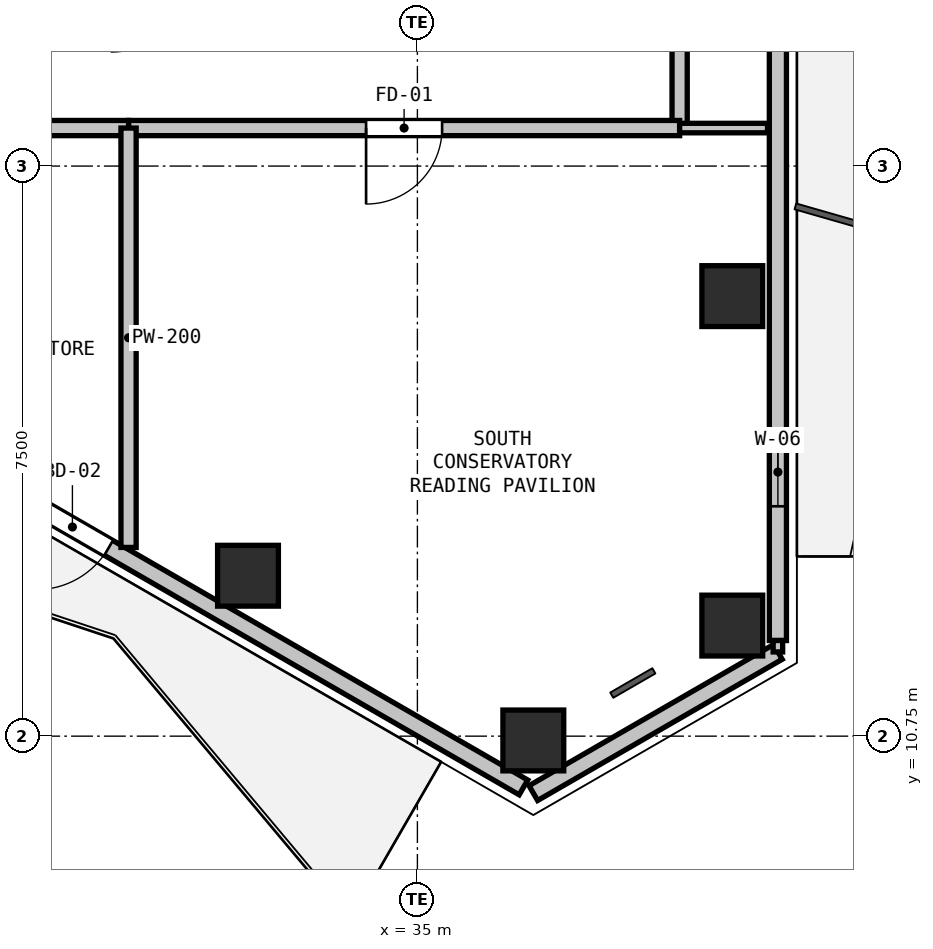
"""IFC4 building model, lengths in metres.
Left out: names, types, materials, properties, quantities, classifications, styles, units other than length and angle.
Written with IfcOpenShell. Run it as: python <this file> out.ifc"""

import sys

from ifc_helpers import new_model, si_unit, direction, frame, frame_2d, origin, origin_2d, place, context, subcontext, project, spatial, rectangle, hollow_rectangle, extrude, element, fill, save


model = new_model("IFC4")
c1 = context("Model", 3, precision=1e-05, world=origin(), true_north=direction((0.0, 1.0)))
c2 = subcontext(c1, "Body", "Model", "MODEL_VIEW")
j1 = project(units=[si_unit("LENGTHUNIT", "METRE"), si_unit("PLANEANGLEUNIT", "RADIAN")], contexts=[c1])
p1 = place(None, origin())
s1 = spatial("IfcSite", under=j1, at=p1, CompositionType="ELEMENT")
p2 = place(p1, origin())
s2 = spatial("IfcBuilding", under=s1, at=p2, CompositionType="ELEMENT")
p3 = place(p2, frame((0.0, 0.0, 249.6)))
s3 = spatial("IfcBuildingStorey", under=s2, at=p3, CompositionType="ELEMENT", Elevation=249.6)
for number, where, z_axis, x_axis in (
    (1, (39.143, 16.539, 0.0), (0.0, 0.0, 1.0), (1.0, 0.0, 0.0)),
    (2, (39.143, 12.205, 0.0), (0.0, 0.0, 1.0), (1.0, 0.0, 0.0)),
    (3, (36.525, 10.693, 0.0), (0.0, 0.0, 1.0), (1.0, 0.0, 0.0)),
    (4, (32.771, 12.861, 0.0), (0.0, 0.0, 1.0), (1.0, 0.0, 0.0)),
):
    element("IfcColumn", number, at=place(p3, frame(where, z_axis=z_axis, x_axis=x_axis)), inside=s3, PredefinedType="COLUMN", context=c2, shape_type="SweptSolid", body=[
        extrude(hollow_rectangle(XDim=0.8, YDim=0.8, WallThickness=0.025, at=origin_2d()), origin(), (0.0, 0.0, 1.0), 4.5),
    ])
p4 = place(p3, frame((39.743, 11.858, 0.0), z_axis=(0.0, 0.0, 1.0), x_axis=(-0.866038962515, -0.499976514854, 0.0)))
e5 = element("IfcWall", 5, at=p4, inside=s3, PredefinedType="SOLIDWALL", context=c2, shape_type="SweptSolid", body=[
    extrude(rectangle(XDim=3.716, YDim=0.225, at=frame_2d((1.858, 0.0))), origin(), (0.0, 0.0, 1.0), 3.84),
])
p5 = place(p3, frame((39.743, 20.936, 0.0), z_axis=(0.0, 0.0, 1.0), x_axis=(0.0, -1.0, 0.0)))
e6 = element("IfcWall", 6, at=p5, inside=s3, PredefinedType="SOLIDWALL", context=c2, shape_type="SweptSolid", body=[
    extrude(rectangle(XDim=8.928, YDim=0.225, at=frame_2d((4.464, 0.0))), origin(), (0.0, 0.0, 1.0), 3.84),
])
p6 = place(p5, frame((6.262, 0.0, 0.9)))
e7 = element("IfcOpeningElement", 7, at=p6, cuts=e6, PredefinedType="OPENING", context=c2, shape_type="SweptSolid", body=[
    extrude(rectangle(XDim=0.9, YDim=1.4, at=frame_2d((0.45, 0.7))), frame((0.0, 0.123, 0.0), z_axis=(0.0, -1.0, 0.0), x_axis=(1.0, 0.0, 0.0)), (0.0, 0.0, 1.0), 0.245),
])
p7 = place(p3, frame((36.395, 10.076, 0.0), z_axis=(0.0, 0.0, 1.0), x_axis=(-0.866026655105, 0.499997832642, 0.0)))
e8 = element("IfcWall", 8, at=p7, inside=s3, PredefinedType="SOLIDWALL", context=c2, shape_type="SweptSolid", body=[
    extrude(rectangle(XDim=8.928, YDim=0.225, at=frame_2d((4.464, 0.0))), origin(), (0.0, 0.0, 1.0), 3.84),
])
p8 = place(p7, frame((6.302, 0.0, 0.0)))
e9 = element("IfcOpeningElement", 9, at=p8, cuts=e8, PredefinedType="OPENING", context=c2, shape_type="SweptSolid", body=[
    extrude(rectangle(XDim=1.1, YDim=2.1, at=frame_2d((0.55, 1.05))), frame((0.0, 0.123, 0.0), z_axis=(0.0, -1.0, 0.0), x_axis=(1.0, 0.0, 0.0)), (0.0, 0.0, 1.0), 0.245),
])
p9 = place(p3, frame((38.45, 34.75, 0.0), z_axis=(0.0, 0.0, 1.0), x_axis=(0.0, -1.0, 0.0)))
e10 = element("IfcWall", 10, at=p9, inside=s3, PredefinedType="PARTITIONING", context=c2, shape_type="SweptSolid", body=[
    extrude(rectangle(XDim=16.0, YDim=0.2, at=frame_2d((8.0, 0.0))), origin(), (0.0, 0.0, 1.0), 4.22),
])
p10 = place(p9, frame((7.1, 0.0, 0.0)))
e11 = element("IfcOpeningElement", 11, at=p10, cuts=e10, PredefinedType="OPENING", context=c2, shape_type="SweptSolid", body=[
    extrude(rectangle(XDim=1.8, YDim=2.2, at=frame_2d((0.9, 1.1))), frame((0.0, 0.11, 0.0), z_axis=(0.0, -1.0, 0.0), x_axis=(1.0, 0.0, 0.0)), (0.0, 0.0, 1.0), 0.22),
])
p11 = place(p3, frame((38.45, 18.75, 0.0), z_axis=(0.0, 0.0, 1.0), x_axis=(-1.0, 0.0, 0.0)))
e12 = element("IfcWall", 12, at=p11, inside=s3, PredefinedType="PARTITIONING", context=c2, shape_type="SweptSolid", body=[
    extrude(rectangle(XDim=7.25, YDim=0.2, at=frame_2d((3.625, 0.0))), origin(), (0.0, 0.0, 1.0), 3.668),
])
p12 = place(p11, frame((3.125, 0.0, 0.0)))
e13 = element("IfcOpeningElement", 13, at=p12, cuts=e12, PredefinedType="OPENING", context=c2, shape_type="SweptSolid", body=[
    extrude(rectangle(XDim=1.0, YDim=2.15, at=frame_2d((0.5, 1.075))), frame((0.0, 0.11, 0.0), z_axis=(0.0, -1.0, 0.0), x_axis=(1.0, 0.0, 0.0)), (0.0, 0.0, 1.0), 0.22),
])
p13 = place(p3, frame((31.2, 18.75, 0.0), z_axis=(0.0, 0.0, 1.0), x_axis=(-1.0, 0.0, 0.0)))
e14 = element("IfcWall", 14, at=p13, inside=s3, PredefinedType="PARTITIONING", context=c2, shape_type="SweptSolid", body=[
    extrude(rectangle(XDim=4.0, YDim=0.2, at=frame_2d((2.0, 0.0))), origin(), (0.0, 0.0, 1.0), 4.22),
])
p14 = place(p13, frame((1.575, 0.0, 0.0)))
e15 = element("IfcOpeningElement", 15, at=p14, cuts=e14, PredefinedType="OPENING", context=c2, shape_type="SweptSolid", body=[
    extrude(rectangle(XDim=0.85, YDim=2.1, at=frame_2d((0.425, 1.05))), frame((0.0, 0.11, 0.0), z_axis=(0.0, -1.0, 0.0), x_axis=(1.0, 0.0, 0.0)), (0.0, 0.0, 1.0), 0.22),
])
p15 = place(p3, frame((39.606, 18.75, 0.0), z_axis=(0.0, 0.0, 1.0), x_axis=(-1.0, 0.0, 0.0)))
e16 = element("IfcWall", 16, at=p15, inside=s3, PredefinedType="PARTITIONING", context=c2, shape_type="SweptSolid", body=[
    extrude(rectangle(XDim=1.156, YDim=0.125, at=frame_2d((0.578, 0.0))), origin(), (0.0, 0.0, 1.0), 2.365),
])
p16 = place(p3, frame((31.2, 13.233, 0.0), z_axis=(0.0, 0.0, 1.0), x_axis=(0.0, 1.0, 0.0)))
e17 = element("IfcWall", 17, at=p16, inside=s3, PredefinedType="PARTITIONING", context=c2, shape_type="SweptSolid", body=[
    extrude(rectangle(XDim=5.517, YDim=0.2, at=frame_2d((2.759, 0.0))), origin(), (0.0, 0.0, 1.0), 2.365),
])
p17 = place(p3, frame((39.743, 12.008, 0.0), z_axis=(0.0, 0.0, 1.0), x_axis=(0.0, -1.0, 0.0)))
e18 = element("IfcWall", 18, at=p17, inside=s3, PredefinedType="PARTITIONING", context=c2, shape_type="SweptSolid", body=[
    extrude(rectangle(XDim=0.15, YDim=0.125, at=frame_2d((0.075, 0.0))), origin(), (0.0, 0.0, 1.0), 4.22),
])
p18 = place(p6, origin())
e19 = element("IfcWindow", 19, at=p18, inside=s3, PartitioningType="SINGLE_PANEL", PredefinedType="WINDOW", context=c2, shape_type="SweptSolid", body=[
    extrude(rectangle(XDim=0.9, YDim=1.4, at=frame_2d((0.45, 0.7))), frame((0.0, 0.03, 0.0), z_axis=(0.0, -1.0, 0.0), x_axis=(1.0, 0.0, 0.0)), (0.0, 0.0, 1.0), 0.06),
])
fill(e7, e19)
p19 = place(p8, origin())
e20 = element("IfcDoor", 20, at=p19, inside=s3, OperationType="SINGLE_SWING_RIGHT", PredefinedType="DOOR", context=c2, shape_type="SweptSolid", body=[
    extrude(rectangle(XDim=1.1, YDim=2.1, at=frame_2d((0.55, 1.05))), frame((0.0, 0.025, 0.0), z_axis=(0.0, -1.0, 0.0), x_axis=(1.0, 0.0, 0.0)), (0.0, 0.0, 1.0), 0.05),
])
fill(e9, e20)
p20 = place(p12, origin())
e21 = element("IfcDoor", 21, at=p20, inside=s3, OperationType="SINGLE_SWING_RIGHT", PredefinedType="DOOR", context=c2, shape_type="SweptSolid", body=[
    extrude(rectangle(XDim=1.0, YDim=2.15, at=frame_2d((0.5, 1.075))), frame((0.0, 0.025, 0.0), z_axis=(0.0, -1.0, 0.0), x_axis=(1.0, 0.0, 0.0)), (0.0, 0.0, 1.0), 0.05),
])
fill(e13, e21)
save(model, sys.argv[1])
